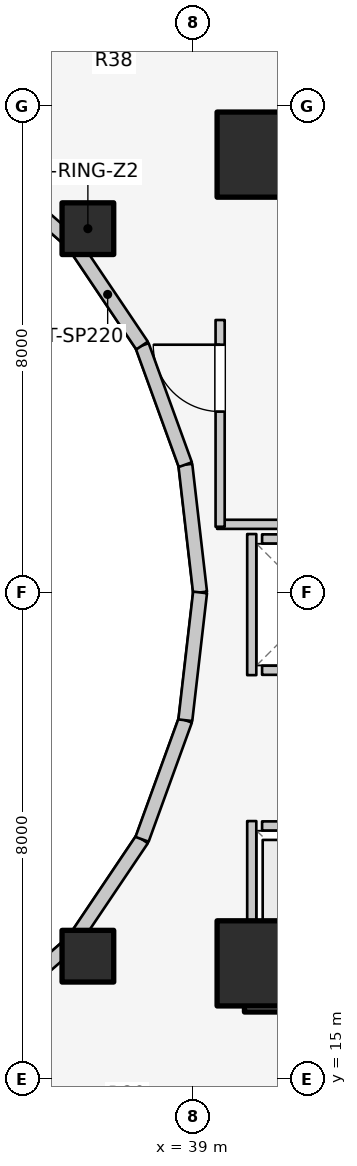
"""IFC4 building model, lengths in metres.
Left out: names, types, materials, properties, quantities, classifications, styles, units other than length and angle.
Written with IfcOpenShell. Run it as: python <this file> out.ifc"""

import sys

from ifc_helpers import new_model, si_unit, direction, frame, frame_2d, origin, origin_2d, place, context, subcontext, project, spatial, rectangle, extrude, element, fill, save


model = new_model("IFC4")
c1 = context("Model", 3, precision=1e-05, world=origin(), true_north=direction((0.0, 1.0)))
c2 = subcontext(c1, "Body", "Model", "MODEL_VIEW")
j1 = project(units=[si_unit("LENGTHUNIT", "METRE"), si_unit("PLANEANGLEUNIT", "RADIAN")], contexts=[c1])
p1 = place(None, origin())
s1 = spatial("IfcSite", under=j1, at=p1, CompositionType="ELEMENT")
p2 = place(p1, origin())
s2 = spatial("IfcBuilding", under=s1, at=p2, CompositionType="ELEMENT")
p3 = place(p2, frame((0.0, 0.0, 82.5)))
s3 = spatial("IfcBuildingStorey", under=s2, at=p3, CompositionType="ELEMENT", Elevation=82.5)
for number, where, z_axis, x_axis in (
    (1, (39.85, 16.55, 0.0), (0.0, 0.0, 1.0), (1.0, 0.0, 0.0)),
    (2, (39.85, 30.35, 0.0), (0.0, 0.0, 1.0), (1.0, 0.0, 0.0)),
):
    element("IfcWall", number, at=place(p3, frame(where, z_axis=z_axis, x_axis=x_axis)), inside=s3, PredefinedType="SHEAR", context=c2, shape_type="SweptSolid", body=[
        extrude(rectangle(XDim=4.5, YDim=0.9, at=frame_2d((2.25, 0.0))), origin(), (0.0, 0.0, 1.0), 3.1),
    ])
for number, where, z_axis, x_axis in (
    (3, (40.1, 16.9, 0.0), (0.0, 0.0, 1.0), (1.0, 0.0, 0.0)),
    (4, (40.1, 30.2, 0.0), (0.0, 0.0, 1.0), (1.0, 0.0, 0.0)),
):
    element("IfcColumn", number, at=place(p3, frame(where, z_axis=z_axis, x_axis=x_axis)), inside=s3, PredefinedType="COLUMN", context=c2, shape_type="SweptSolid", body=[
        extrude(rectangle(XDim=1.4, YDim=1.4, at=origin_2d()), origin(), (0.0, 0.0, 1.0), 3.1),
    ])
for number, where, z_axis, x_axis in (
    (5, (37.275, 28.982, 0.0), (0.0, 0.0, 1.0), (1.0, 0.0, 0.0)),
    (6, (37.275, 17.018, 0.0), (0.0, 0.0, 1.0), (1.0, 0.0, 0.0)),
):
    element("IfcColumn", number, at=place(p3, frame(where, z_axis=z_axis, x_axis=x_axis)), inside=s3, PredefinedType="COLUMN", context=c2, shape_type="SweptSolid", body=[
        extrude(rectangle(XDim=0.85, YDim=0.85, at=origin_2d()), origin(), (0.0, 0.0, 1.0), 3.1),
    ])
p4 = place(p3, frame((39.12, 23.0, 0.0), z_axis=(0.0, 0.0, 1.0), x_axis=(-0.114711713601, 0.993398823617, 0.0)))
e7 = element("IfcWall", 7, at=p4, inside=s3, PredefinedType="STANDARD", context=c2, shape_type="SweptSolid", body=[
    extrude(rectangle(XDim=2.115, YDim=0.23, at=frame_2d((1.058, 0.0))), origin(), (0.0, 0.0, 1.0), 2.56),
])
p5 = place(p3, frame((38.877, 25.102, 0.0), z_axis=(0.0, 0.0, 1.0), x_axis=(-0.341423187295, 0.93990968033, 0.0)))
e8 = element("IfcWall", 8, at=p5, inside=s3, PredefinedType="STANDARD", context=c2, shape_type="SweptSolid", body=[
    extrude(rectangle(XDim=2.084, YDim=0.23, at=frame_2d((1.042, 0.0))), origin(), (0.0, 0.0, 1.0), 2.56),
])
p6 = place(p3, frame((38.166, 27.06, 0.0), z_axis=(0.0, 0.0, 1.0), x_axis=(-0.558197800898, 0.829707909492, 0.0)))
e9 = element("IfcWall", 9, at=p6, inside=s3, PredefinedType="STANDARD", context=c2, shape_type="SweptSolid", body=[
    extrude(rectangle(XDim=2.027, YDim=0.23, at=frame_2d((1.013, 0.0))), origin(), (0.0, 0.0, 1.0), 1.22),
])
for number, where, z_axis, x_axis in (
    (10, (37.035, 28.742, 0.0), (0.0, 0.0, 1.0), (-0.753, 0.659, 0.0)),
    (11, (35.56, 15.968, 0.0), (0.0, 0.0, 1.0), (0.753, 0.659, 0.0)),
):
    element("IfcWall", number, at=place(p3, frame(where, z_axis=z_axis, x_axis=x_axis)), inside=s3, PredefinedType="STANDARD", context=c2, shape_type="SweptSolid", body=[
        extrude(rectangle(XDim=1.959, YDim=0.23, at=frame_2d((0.98, 0.0))), origin(), (0.0, 0.0, 1.0), 1.22),
    ])
p7 = place(p3, frame((37.035, 17.258, 0.0), z_axis=(0.0, 0.0, 1.0), x_axis=(0.558197800898, 0.829707909492, 0.0)))
e12 = element("IfcWall", 12, at=p7, inside=s3, PredefinedType="STANDARD", context=c2, shape_type="SweptSolid", body=[
    extrude(rectangle(XDim=2.027, YDim=0.23, at=frame_2d((1.013, 0.0))), origin(), (0.0, 0.0, 1.0), 1.22),
])
p8 = place(p3, frame((38.166, 18.94, 0.0), z_axis=(0.0, 0.0, 1.0), x_axis=(0.341423187295, 0.93990968033, 0.0)))
e13 = element("IfcWall", 13, at=p8, inside=s3, PredefinedType="STANDARD", context=c2, shape_type="SweptSolid", body=[
    extrude(rectangle(XDim=2.084, YDim=0.23, at=frame_2d((1.042, 0.0))), origin(), (0.0, 0.0, 1.0), 2.56),
])
p9 = place(p3, frame((38.877, 20.898, 0.0), z_axis=(0.0, 0.0, 1.0), x_axis=(0.114711713601, 0.993398823617, 0.0)))
e14 = element("IfcWall", 14, at=p9, inside=s3, PredefinedType="STANDARD", context=c2, shape_type="SweptSolid", body=[
    extrude(rectangle(XDim=2.115, YDim=0.23, at=frame_2d((1.058, 0.0))), origin(), (0.0, 0.0, 1.0), 2.56),
])
p10 = place(p3, frame((40.14, 19.16, 0.0), z_axis=(0.0, 0.0, 1.0), x_axis=(1.0, 0.0, 0.0)))
e15 = element("IfcWall", 15, at=p10, inside=s3, PredefinedType="SOLIDWALL", context=c2, shape_type="SweptSolid", body=[
    extrude(rectangle(XDim=1.82, YDim=0.15, at=frame_2d((0.91, 0.0))), origin(), (0.0, 0.0, 1.0), 2.12),
])
p11 = place(p10, frame((0.36, 0.0, 0.0)))
e16 = element("IfcOpeningElement", 16, at=p11, cuts=e15, PredefinedType="OPENING", context=c2, shape_type="SweptSolid", body=[
    extrude(rectangle(XDim=1.1, YDim=2.1, at=frame_2d((0.55, 1.05))), frame((0.0, 0.085, 0.0), z_axis=(0.0, -1.0, 0.0), x_axis=(1.0, 0.0, 0.0)), (0.0, 0.0, 1.0), 0.17),
])
p12 = place(p3, frame((40.14, 17.1, 0.0), z_axis=(0.0, 0.0, 1.0), x_axis=(1.0, 0.0, 0.0)))
e17 = element("IfcWall", 17, at=p12, inside=s3, PredefinedType="SOLIDWALL", context=c2, shape_type="SweptSolid", body=[
    extrude(rectangle(XDim=1.82, YDim=0.15, at=frame_2d((0.91, 0.0))), origin(), (0.0, 0.0, 1.0), 2.12),
])
p13 = place(p3, frame((39.97, 17.02, 0.0), z_axis=(0.0, 0.0, 1.0), x_axis=(0.0, 1.0, 0.0)))
e18 = element("IfcWall", 18, at=p13, inside=s3, PredefinedType="SOLIDWALL", context=c2, shape_type="SweptSolid", body=[
    extrude(rectangle(XDim=2.22, YDim=0.15, at=frame_2d((1.11, 0.0))), origin(), (0.0, 0.0, 1.0), 1.873),
])
for number, where, z_axis, x_axis in (
    (19, (40.14, 21.72, 0.0), (0.0, 0.0, 1.0), (1.0, 0.0, 0.0)),
    (20, (40.14, 23.88, 0.0), (0.0, 0.0, 1.0), (1.0, 0.0, 0.0)),
):
    element("IfcWall", number, at=place(p3, frame(where, z_axis=z_axis, x_axis=x_axis)), inside=s3, PredefinedType="SOLIDWALL", context=c2, shape_type="SweptSolid", body=[
        extrude(rectangle(XDim=1.82, YDim=0.15, at=frame_2d((0.91, 0.0))), origin(), (0.0, 0.0, 1.0), 2.12),
    ])
p14 = place(p3, frame((39.97, 21.64, 0.0), z_axis=(0.0, 0.0, 1.0), x_axis=(0.0, 1.0, 0.0)))
e21 = element("IfcWall", 21, at=p14, inside=s3, PredefinedType="SOLIDWALL", context=c2, shape_type="SweptSolid", body=[
    extrude(rectangle(XDim=2.32, YDim=0.15, at=frame_2d((1.16, 0.0))), origin(), (0.0, 0.0, 1.0), 2.12),
])
p15 = place(p3, frame((39.4, 24.12, 0.0), z_axis=(0.0, 0.0, 1.0), x_axis=(1.0, 0.0, 0.0)))
e22 = element("IfcWall", 22, at=p15, inside=s3, PredefinedType="PARTITIONING", context=c2, shape_type="SweptSolid", body=[
    extrude(rectangle(XDim=5.08, YDim=0.15, at=frame_2d((2.54, 0.0))), origin(), (0.0, 0.0, 1.0), 2.12),
])
p16 = place(p3, frame((39.45, 24.08, 0.0), z_axis=(0.0, 0.0, 1.0), x_axis=(0.0, 1.0, 0.0)))
e23 = element("IfcWall", 23, at=p16, inside=s3, PredefinedType="PARTITIONING", context=c2, shape_type="SweptSolid", body=[
    extrude(rectangle(XDim=3.4, YDim=0.15, at=frame_2d((1.7, 0.0))), origin(), (0.0, 0.0, 1.0), 2.575),
])
p17 = place(p16, frame((1.894, 0.0, 0.0)))
e24 = element("IfcOpeningElement", 24, at=p17, cuts=e23, PredefinedType="OPENING", context=c2, shape_type="SweptSolid", body=[
    extrude(rectangle(XDim=1.1, YDim=2.1, at=frame_2d((0.55, 1.05))), frame((0.0, 0.085, 0.0), z_axis=(0.0, -1.0, 0.0), x_axis=(1.0, 0.0, 0.0)), (0.0, 0.0, 1.0), 0.17),
])
p18 = place(p17, origin())
e25 = element("IfcDoor", 25, at=p18, inside=s3, OperationType="SINGLE_SWING_RIGHT", PredefinedType="DOOR", context=c2, shape_type="SweptSolid", body=[
    extrude(rectangle(XDim=1.1, YDim=2.1, at=frame_2d((0.55, 1.05))), frame((0.0, 0.025, 0.0), z_axis=(0.0, -1.0, 0.0), x_axis=(1.0, 0.0, 0.0)), (0.0, 0.0, 1.0), 0.05),
])
fill(e24, e25)
save(model, sys.argv[1])
